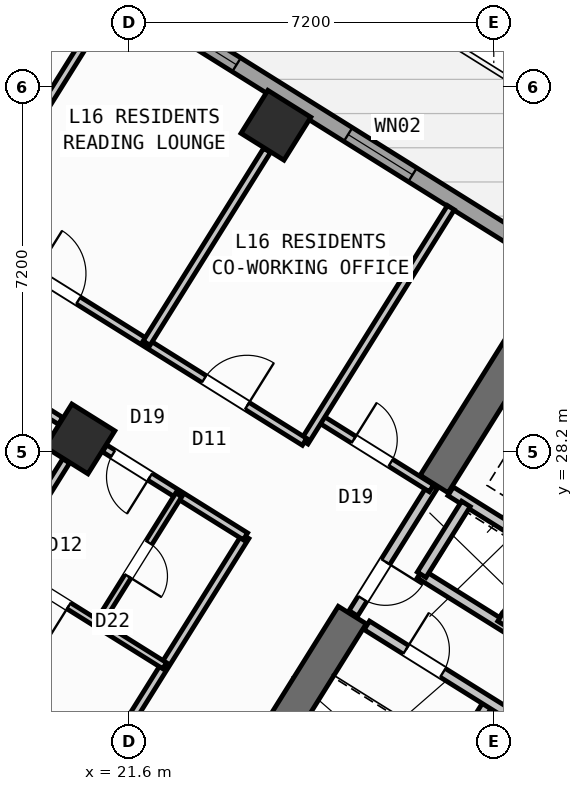
"""IFC4 building model, lengths in metres.
Left out: names, types, materials, properties, quantities, classifications, styles, units other than length and angle.
Written with IfcOpenShell. Run it as: python <this file> out.ifc"""

import sys

from ifc_helpers import new_model, si_unit, direction, frame, frame_2d, origin, origin_2d, place, context, subcontext, project, spatial, rectangle, hollow_rectangle, extrude, source, transform, mapped, element, fill, save


model = new_model("IFC4")
c1 = context("Model", 3, precision=1e-05, world=origin(), true_north=direction((0.0, 1.0)))
c2 = subcontext(c1, "Body", "Model", "MODEL_VIEW")
j1 = project(units=[si_unit("LENGTHUNIT", "METRE"), si_unit("PLANEANGLEUNIT", "RADIAN")], contexts=[c1])
p1 = place(None, origin())
s1 = spatial("IfcSite", under=j1, at=p1, CompositionType="ELEMENT")
p2 = place(p1, origin())
s2 = spatial("IfcBuilding", under=s1, at=p2, CompositionType="ELEMENT")
p3 = place(p2, frame((0.0, 0.0, 63.6)))
s3 = spatial("IfcBuildingStorey", under=s2, at=p3, CompositionType="ELEMENT", Elevation=63.6)
p4 = place(p3, frame((29.491, 30.552, 0.0), z_axis=(0.0, 0.0, 1.0), x_axis=(-0.529893103397, -0.8480644427, 0.0)))
e1 = element("IfcWall", 1, at=p4, inside=s3, PredefinedType="SHEAR", context=c2, shape_type="SweptSolid", body=[
    extrude(rectangle(XDim=3.525, YDim=0.65, at=frame_2d((1.763, 0.0))), origin(), (0.0, 0.0, 1.0), 3.35),
])
p5 = place(p3, frame((26.007, 24.976, 0.0), z_axis=(0.0, 0.0, 1.0), x_axis=(-0.529916319127, -0.848049936456, 0.0)))
e2 = element("IfcWall", 2, at=p5, inside=s3, PredefinedType="SHEAR", context=c2, shape_type="SweptSolid", body=[
    extrude(rectangle(XDim=6.375, YDim=0.65, at=frame_2d((3.188, 0.0))), origin(), (0.0, 0.0, 1.0), 3.35),
])
m1 = source(origin(), c2, "Body", "SweptSolid", [
    extrude(hollow_rectangle(XDim=1.0, YDim=1.0, WallThickness=0.04, at=origin_2d()), origin(), (0.0, 0.0, 1.0), 3.6),
])
for number, where, z_axis, x_axis in (
    (3, (24.5, 34.643, 0.0), (0.0, 0.0, 1.0), (-0.848, 0.53, 0.0)),
    (4, (20.632, 28.452, 0.0), (0.0, 0.0, 1.0), (-0.848, 0.53, 0.0)),
):
    element("IfcColumn", number, at=place(p3, frame(where, z_axis=z_axis, x_axis=x_axis)), inside=s3, PredefinedType="COLUMN", context=c2, shape_type="MappedRepresentation", body=[
        mapped(m1, transform((0.0, 0.0, 0.0), scale=1.0)),
    ])
p6 = place(p3, frame((29.268, 6.429, 0.0), z_axis=(0.0, 0.0, 1.0), x_axis=(-0.848049971435, 0.529916263149, 0.0)))
e5 = element("IfcWall", 5, at=p6, inside=s3, PredefinedType="STANDARD", context=c2, shape_type="SweptSolid", body=[
    extrude(rectangle(XDim=31.588, YDim=0.32, at=frame_2d((15.794, 0.0))), origin(), (0.0, 0.0, 1.0), 3.35),
])
p7 = place(p6, frame((16.362, 0.0, 0.0)))
e6 = element("IfcOpeningElement", 6, at=p7, cuts=e5, PredefinedType="OPENING", context=c2, shape_type="SweptSolid", body=[
    extrude(rectangle(XDim=1.2, YDim=2.15, at=frame_2d((0.6, 1.075))), frame((0.0, 0.17, 0.0), z_axis=(0.0, -1.0, 0.0), x_axis=(1.0, 0.0, 0.0)), (0.0, 0.0, 1.0), 0.34),
])
p8 = place(p6, frame((2.989, 0.0, 0.8)))
e7 = element("IfcOpeningElement", 7, at=p8, cuts=e5, PredefinedType="OPENING", context=c2, shape_type="SweptSolid", body=[
    extrude(rectangle(XDim=2.1, YDim=1.55, at=frame_2d((1.05, 0.775))), frame((0.0, 0.17, 0.0), z_axis=(0.0, -1.0, 0.0), x_axis=(1.0, 0.0, 0.0)), (0.0, 0.0, 1.0), 0.34),
])
p9 = place(p6, frame((8.359, 0.0, 0.8)))
e8 = element("IfcOpeningElement", 8, at=p9, cuts=e5, PredefinedType="OPENING", context=c2, shape_type="SweptSolid", body=[
    extrude(rectangle(XDim=2.1, YDim=1.55, at=frame_2d((1.05, 0.775))), frame((0.0, 0.17, 0.0), z_axis=(0.0, -1.0, 0.0), x_axis=(1.0, 0.0, 0.0)), (0.0, 0.0, 1.0), 0.34),
])
p10 = place(p6, frame((13.284, 0.0, 0.95)))
e9 = element("IfcOpeningElement", 9, at=p10, cuts=e5, PredefinedType="OPENING", context=c2, shape_type="SweptSolid", body=[
    extrude(rectangle(XDim=1.2, YDim=1.4, at=frame_2d((0.6, 0.7))), frame((0.0, 0.17, 0.0), z_axis=(0.0, -1.0, 0.0), x_axis=(1.0, 0.0, 0.0)), (0.0, 0.0, 1.0), 0.34),
])
p11 = place(p6, frame((29.188, 0.0, 0.95)))
e10 = element("IfcOpeningElement", 10, at=p11, cuts=e5, PredefinedType="OPENING", context=c2, shape_type="SweptSolid", body=[
    extrude(rectangle(XDim=1.2, YDim=1.4, at=frame_2d((0.6, 0.7))), frame((0.0, 0.17, 0.0), z_axis=(0.0, -1.0, 0.0), x_axis=(1.0, 0.0, 0.0)), (0.0, 0.0, 1.0), 0.34),
])
p12 = place(p6, frame((19.11, 0.0, 1.0)))
e11 = element("IfcOpeningElement", 11, at=p12, cuts=e5, PredefinedType="OPENING", context=c2, shape_type="SweptSolid", body=[
    extrude(rectangle(XDim=0.9, YDim=1.25, at=frame_2d((0.45, 0.625))), frame((0.0, 0.17, 0.0), z_axis=(0.0, -1.0, 0.0), x_axis=(1.0, 0.0, 0.0)), (0.0, 0.0, 1.0), 0.34),
])
p13 = place(p6, frame((21.226, 0.0, 1.0)))
e12 = element("IfcOpeningElement", 12, at=p13, cuts=e5, PredefinedType="OPENING", context=c2, shape_type="SweptSolid", body=[
    extrude(rectangle(XDim=0.9, YDim=1.25, at=frame_2d((0.45, 0.625))), frame((0.0, 0.17, 0.0), z_axis=(0.0, -1.0, 0.0), x_axis=(1.0, 0.0, 0.0)), (0.0, 0.0, 1.0), 0.34),
])
p14 = place(p6, frame((23.014, 0.0, 1.0)))
e13 = element("IfcOpeningElement", 13, at=p14, cuts=e5, PredefinedType="OPENING", context=c2, shape_type="SweptSolid", body=[
    extrude(rectangle(XDim=0.9, YDim=1.25, at=frame_2d((0.45, 0.625))), frame((0.0, 0.17, 0.0), z_axis=(0.0, -1.0, 0.0), x_axis=(1.0, 0.0, 0.0)), (0.0, 0.0, 1.0), 0.34),
])
p15 = place(p6, frame((24.802, 0.0, 1.0)))
e14 = element("IfcOpeningElement", 14, at=p15, cuts=e5, PredefinedType="OPENING", context=c2, shape_type="SweptSolid", body=[
    extrude(rectangle(XDim=0.9, YDim=1.25, at=frame_2d((0.45, 0.625))), frame((0.0, 0.17, 0.0), z_axis=(0.0, -1.0, 0.0), x_axis=(1.0, 0.0, 0.0)), (0.0, 0.0, 1.0), 0.34),
])
p16 = place(p6, frame((26.59, 0.0, 1.0)))
e15 = element("IfcOpeningElement", 15, at=p16, cuts=e5, PredefinedType="OPENING", context=c2, shape_type="SweptSolid", body=[
    extrude(rectangle(XDim=0.9, YDim=1.25, at=frame_2d((0.45, 0.625))), frame((0.0, 0.17, 0.0), z_axis=(0.0, -1.0, 0.0), x_axis=(1.0, 0.0, 0.0)), (0.0, 0.0, 1.0), 0.34),
])
p17 = place(p3, frame((14.138, 41.825, 0.0), z_axis=(0.0, 0.0, 1.0), x_axis=(0.848046498049, -0.529921821731, 0.0)))
e16 = element("IfcWall", 16, at=p17, inside=s3, PredefinedType="STANDARD", context=c2, shape_type="SweptSolid", body=[
    extrude(rectangle(XDim=31.588, YDim=0.32, at=frame_2d((15.794, 0.0))), origin(), (0.0, 0.0, 1.0), 3.35),
])
p18 = place(p17, frame((2.526, 0.0, 0.0)))
e17 = element("IfcOpeningElement", 17, at=p18, cuts=e16, PredefinedType="OPENING", context=c2, shape_type="SweptSolid", body=[
    extrude(rectangle(XDim=1.05, YDim=2.15, at=frame_2d((0.525, 1.075))), frame((0.0, 0.17, 0.0), z_axis=(0.0, -1.0, 0.0), x_axis=(1.0, 0.0, 0.0)), (0.0, 0.0, 1.0), 0.34),
])
p19 = place(p17, frame((0.825, 0.0, 0.95)))
e18 = element("IfcOpeningElement", 18, at=p19, cuts=e16, PredefinedType="OPENING", context=c2, shape_type="SweptSolid", body=[
    extrude(rectangle(XDim=1.2, YDim=1.4, at=frame_2d((0.6, 0.7))), frame((0.0, 0.17, 0.0), z_axis=(0.0, -1.0, 0.0), x_axis=(1.0, 0.0, 0.0)), (0.0, 0.0, 1.0), 0.34),
])
p20 = place(p17, frame((9.502, 0.0, 0.85)))
e19 = element("IfcOpeningElement", 19, at=p20, cuts=e16, PredefinedType="OPENING", context=c2, shape_type="SweptSolid", body=[
    extrude(rectangle(XDim=1.8, YDim=1.5, at=frame_2d((0.9, 0.75))), frame((0.0, 0.17, 0.0), z_axis=(0.0, -1.0, 0.0), x_axis=(1.0, 0.0, 0.0)), (0.0, 0.0, 1.0), 0.34),
])
p21 = place(p17, frame((13.899, 0.0, 0.85)))
e20 = element("IfcOpeningElement", 20, at=p21, cuts=e16, PredefinedType="OPENING", context=c2, shape_type="SweptSolid", body=[
    extrude(rectangle(XDim=1.5, YDim=1.5, at=frame_2d((0.75, 0.75))), frame((0.0, 0.17, 0.0), z_axis=(0.0, -1.0, 0.0), x_axis=(1.0, 0.0, 0.0)), (0.0, 0.0, 1.0), 0.34),
])
p22 = place(p17, frame((22.019, 0.0, 0.95)))
e21 = element("IfcOpeningElement", 21, at=p22, cuts=e16, PredefinedType="OPENING", context=c2, shape_type="SweptSolid", body=[
    extrude(rectangle(XDim=1.2, YDim=1.4, at=frame_2d((0.6, 0.7))), frame((0.0, 0.17, 0.0), z_axis=(0.0, -1.0, 0.0), x_axis=(1.0, 0.0, 0.0)), (0.0, 0.0, 1.0), 0.34),
])
p23 = place(p17, frame((27.569, 0.0, 0.95)))
e22 = element("IfcOpeningElement", 22, at=p23, cuts=e16, PredefinedType="OPENING", context=c2, shape_type="SweptSolid", body=[
    extrude(rectangle(XDim=1.2, YDim=1.4, at=frame_2d((0.6, 0.7))), frame((0.0, 0.17, 0.0), z_axis=(0.0, -1.0, 0.0), x_axis=(1.0, 0.0, 0.0)), (0.0, 0.0, 1.0), 0.34),
])
p24 = place(p3, frame((31.822, 24.998, 0.0), z_axis=(0.0, 0.0, 1.0), x_axis=(-0.848058348634, 0.529902856485, 0.0)))
e23 = element("IfcWall", 23, at=p24, inside=s3, PredefinedType="STANDARD", context=c2, shape_type="SweptSolid", body=[
    extrude(rectangle(XDim=4.568, YDim=0.2, at=frame_2d((2.284, 0.0))), origin(), (0.0, 0.0, 1.0), 3.34),
])
p25 = place(p3, frame((32.108, 22.814, 0.0), z_axis=(0.0, 0.0, 1.0), x_axis=(-0.848042229521, 0.529928652696, 0.0)))
e24 = element("IfcWall", 24, at=p25, inside=s3, PredefinedType="STANDARD", context=c2, shape_type="SweptSolid", body=[
    extrude(rectangle(XDim=5.62, YDim=0.2, at=frame_2d((2.81, 0.0))), origin(), (0.0, 0.0, 1.0), 3.34),
])
p26 = place(p3, frame((28.25, 27.17, 0.0), z_axis=(0.0, 0.0, 1.0), x_axis=(-0.529905827651, -0.848056492117, 0.0)))
e25 = element("IfcWall", 25, at=p26, inside=s3, PredefinedType="STANDARD", context=c2, shape_type="SweptSolid", body=[
    extrude(rectangle(XDim=1.65, YDim=0.2, at=frame_2d((0.825, 0.0))), origin(), (0.0, 0.0, 1.0), 3.34),
])
p27 = place(p3, frame((29.801, 26.142, 0.0), z_axis=(0.0, 0.0, 1.0), x_axis=(-0.529998940003, -0.847998304005, 0.0)))
e26 = element("IfcWall", 26, at=p27, inside=s3, PredefinedType="STANDARD", context=c2, shape_type="SweptSolid", body=[
    extrude(rectangle(XDim=1.58, YDim=0.2, at=frame_2d((0.79, 0.0))), origin(), (0.0, 0.0, 1.0), 3.34),
])
p28 = place(p3, frame((28.71, 23.263, 0.0), z_axis=(0.0, 0.0, 1.0), x_axis=(-0.529907497854, -0.848055448493, 0.0)))
e27 = element("IfcWall", 27, at=p28, inside=s3, PredefinedType="STANDARD", context=c2, shape_type="SweptSolid", body=[
    extrude(rectangle(XDim=2.88, YDim=0.2, at=frame_2d((1.44, 0.0))), origin(), (0.0, 0.0, 1.0), 3.34),
])
p29 = place(p3, frame((31.525, 21.504, 0.0), z_axis=(0.0, 0.0, 1.0), x_axis=(-0.848044998614, 0.529924221305, 0.0)))
e28 = element("IfcWall", 28, at=p29, inside=s3, PredefinedType="STANDARD", context=c2, shape_type="SweptSolid", body=[
    extrude(rectangle(XDim=6.168, YDim=0.2, at=frame_2d((3.084, 0.0))), origin(), (0.0, 0.0, 1.0), 3.34),
])
p30 = place(p29, frame((4.4, 0.0, 0.0)))
e29 = element("IfcOpeningElement", 29, at=p30, cuts=e28, PredefinedType="OPENING", context=c2, shape_type="SweptSolid", body=[
    extrude(rectangle(XDim=0.86, YDim=2.05, at=frame_2d((0.43, 1.025))), frame((0.0, 0.11, 0.0), z_axis=(0.0, -1.0, 0.0), x_axis=(1.0, 0.0, 0.0)), (0.0, 0.0, 1.0), 0.22),
])
p31 = place(p29, frame((1.45, 0.0, 0.0)))
e30 = element("IfcOpeningElement", 30, at=p31, cuts=e28, PredefinedType="OPENING", context=c2, shape_type="SweptSolid", body=[
    extrude(rectangle(XDim=0.86, YDim=2.05, at=frame_2d((0.43, 1.025))), frame((0.0, 0.11, 0.0), z_axis=(0.0, -1.0, 0.0), x_axis=(1.0, 0.0, 0.0)), (0.0, 0.0, 1.0), 0.22),
])
p32 = place(p3, frame((27.596, 27.52, 0.0), z_axis=(0.0, 0.0, 1.0), x_axis=(-0.529865479138, -0.848081702443, 0.0)))
e31 = element("IfcWall", 31, at=p32, inside=s3, PredefinedType="STANDARD", context=c2, shape_type="SweptSolid", body=[
    extrude(rectangle(XDim=2.96, YDim=0.2, at=frame_2d((1.48, 0.0))), origin(), (0.0, 0.0, 1.0), 3.34),
])
p33 = place(p32, frame((1.76, 0.0, 0.0)))
e32 = element("IfcOpeningElement", 32, at=p33, cuts=e31, PredefinedType="OPENING", context=c2, shape_type="SweptSolid", body=[
    extrude(rectangle(XDim=0.86, YDim=2.05, at=frame_2d((0.43, 1.025))), frame((0.0, 0.11, 0.0), z_axis=(0.0, -1.0, 0.0), x_axis=(1.0, 0.0, 0.0)), (0.0, 0.0, 1.0), 0.22),
])
p34 = place(p3, frame((27.57, 27.478, 0.0), z_axis=(0.0, 0.0, 1.0), x_axis=(-0.848050851465, 0.529914854792, 0.0)))
e33 = element("IfcWall", 33, at=p34, inside=s3, PredefinedType="PARTITIONING", context=c2, shape_type="SweptSolid", body=[
    extrude(rectangle(XDim=2.61, YDim=0.16, at=frame_2d((1.305, 0.0))), origin(), (0.0, 0.0, 1.0), 3.34),
])
p35 = place(p34, frame((0.95, 0.0, 0.0)))
e34 = element("IfcOpeningElement", 34, at=p35, cuts=e33, PredefinedType="OPENING", context=c2, shape_type="SweptSolid", body=[
    extrude(rectangle(XDim=0.86, YDim=2.05, at=frame_2d((0.43, 1.025))), frame((0.0, 0.09, 0.0), z_axis=(0.0, -1.0, 0.0), x_axis=(1.0, 0.0, 0.0)), (0.0, 0.0, 1.0), 0.18),
])
p36 = place(p3, frame((27.953, 33.016, 0.0), z_axis=(0.0, 0.0, 1.0), x_axis=(-0.529906322364, -0.848056182997, 0.0)))
e35 = element("IfcWall", 35, at=p36, inside=s3, PredefinedType="PARTITIONING", context=c2, shape_type="SweptSolid", body=[
    extrude(rectangle(XDim=5.45, YDim=0.16, at=frame_2d((2.725, 0.0))), origin(), (0.0, 0.0, 1.0), 3.34),
])
p37 = place(p3, frame((23.899, 26.529, 0.0), z_axis=(0.0, 0.0, 1.0), x_axis=(-0.529917716469, -0.848049063305, 0.0)))
e36 = element("IfcWall", 36, at=p37, inside=s3, PredefinedType="PARTITIONING", context=c2, shape_type="SweptSolid", body=[
    extrude(rectangle(XDim=14.05, YDim=0.16, at=frame_2d((7.025, 0.0))), origin(), (0.0, 0.0, 1.0), 3.34),
])
p38 = place(p3, frame((25.065, 28.394, 0.0), z_axis=(0.0, 0.0, 1.0), x_axis=(-0.848048310262, 0.529918921593, 0.0)))
e37 = element("IfcWall", 37, at=p38, inside=s3, PredefinedType="PARTITIONING", context=c2, shape_type="SweptSolid", body=[
    extrude(rectangle(XDim=16.73, YDim=0.16, at=frame_2d((8.365, 0.0))), origin(), (0.0, 0.0, 1.0), 3.34),
])
p39 = place(p38, frame((1.338, 0.0, 0.0)))
e38 = element("IfcOpeningElement", 38, at=p39, cuts=e37, PredefinedType="OPENING", context=c2, shape_type="SweptSolid", body=[
    extrude(rectangle(XDim=1.0, YDim=2.1, at=frame_2d((0.5, 1.05))), frame((0.0, 0.09, 0.0), z_axis=(0.0, -1.0, 0.0), x_axis=(1.0, 0.0, 0.0)), (0.0, 0.0, 1.0), 0.18),
])
p40 = place(p38, frame((5.265, 0.0, 0.0)))
e39 = element("IfcOpeningElement", 39, at=p40, cuts=e37, PredefinedType="OPENING", context=c2, shape_type="SweptSolid", body=[
    extrude(rectangle(XDim=1.0, YDim=2.1, at=frame_2d((0.5, 1.05))), frame((0.0, 0.09, 0.0), z_axis=(0.0, -1.0, 0.0), x_axis=(1.0, 0.0, 0.0)), (0.0, 0.0, 1.0), 0.18),
])
p41 = place(p38, frame((9.526, 0.0, 0.0)))
e40 = element("IfcOpeningElement", 40, at=p41, cuts=e37, PredefinedType="OPENING", context=c2, shape_type="SweptSolid", body=[
    extrude(rectangle(XDim=1.0, YDim=2.1, at=frame_2d((0.5, 1.05))), frame((0.0, 0.09, 0.0), z_axis=(0.0, -1.0, 0.0), x_axis=(1.0, 0.0, 0.0)), (0.0, 0.0, 1.0), 0.18),
])
p42 = place(p38, frame((13.954, 0.0, 0.0)))
e41 = element("IfcOpeningElement", 41, at=p42, cuts=e37, PredefinedType="OPENING", context=c2, shape_type="SweptSolid", body=[
    extrude(rectangle(XDim=1.0, YDim=2.1, at=frame_2d((0.5, 1.05))), frame((0.0, 0.09, 0.0), z_axis=(0.0, -1.0, 0.0), x_axis=(1.0, 0.0, 0.0)), (0.0, 0.0, 1.0), 0.18),
])
p43 = place(p3, frame((23.899, 26.529, 0.0), z_axis=(0.0, 0.0, 1.0), x_axis=(-0.848061058944, 0.529898518871, 0.0)))
e42 = element("IfcWall", 42, at=p43, inside=s3, PredefinedType="PARTITIONING", context=c2, shape_type="SweptSolid", body=[
    extrude(rectangle(XDim=3.278, YDim=0.16, at=frame_2d((1.639, 0.0))), origin(), (0.0, 0.0, 1.0), 2.725),
])
p44 = place(p43, frame((2.22, 0.0, 0.0)))
e43 = element("IfcOpeningElement", 43, at=p44, cuts=e42, PredefinedType="OPENING", context=c2, shape_type="SweptSolid", body=[
    extrude(rectangle(XDim=0.86, YDim=2.05, at=frame_2d((0.43, 1.025))), frame((0.0, 0.09, 0.0), z_axis=(0.0, -1.0, 0.0), x_axis=(1.0, 0.0, 0.0)), (0.0, 0.0, 1.0), 0.18),
])
p45 = place(p3, frame((20.251, 28.808, 0.0), z_axis=(0.0, 0.0, 1.0), x_axis=(-0.848044224181, 0.529925460639, 0.0)))
e44 = element("IfcWall", 44, at=p45, inside=s3, PredefinedType="PARTITIONING", context=c2, shape_type="SweptSolid", body=[
    extrude(rectangle(XDim=5.376, YDim=0.16, at=frame_2d((2.688, 0.0))), origin(), (0.0, 0.0, 1.0), 2.725),
])
p46 = place(p3, frame((20.361, 28.018, 0.0), z_axis=(0.0, 0.0, 1.0), x_axis=(-0.529915015264, -0.848050751193, 0.0)))
e45 = element("IfcWall", 45, at=p46, inside=s3, PredefinedType="PARTITIONING", context=c2, shape_type="SweptSolid", body=[
    extrude(rectangle(XDim=6.276, YDim=0.16, at=frame_2d((3.138, 0.0))), origin(), (0.0, 0.0, 1.0), 2.725),
])
p47 = place(p3, frame((22.304, 23.976, 0.0), z_axis=(0.0, 0.0, 1.0), x_axis=(-0.84803087207, 0.529946827537, 0.0)))
e46 = element("IfcWall", 46, at=p47, inside=s3, PredefinedType="PLUMBINGWALL", context=c2, shape_type="SweptSolid", body=[
    extrude(rectangle(XDim=3.79, YDim=0.14, at=frame_2d((1.895, 0.0))), origin(), (0.0, 0.0, 1.0), 3.34),
])
p48 = place(p47, frame((2.23, 0.0, 0.0)))
e47 = element("IfcOpeningElement", 47, at=p48, cuts=e46, PredefinedType="OPENING", context=c2, shape_type="SweptSolid", body=[
    extrude(rectangle(XDim=0.92, YDim=2.08, at=frame_2d((0.46, 1.04))), frame((0.0, 0.08, 0.0), z_axis=(0.0, -1.0, 0.0), x_axis=(1.0, 0.0, 0.0)), (0.0, 0.0, 1.0), 0.16),
])
p49 = place(p3, frame((22.585, 27.35, 0.0), z_axis=(0.0, 0.0, 1.0), x_axis=(-0.529977067289, -0.848011974059, 0.0)))
e48 = element("IfcWall", 48, at=p49, inside=s3, PredefinedType="PLUMBINGWALL", context=c2, shape_type="SweptSolid", body=[
    extrude(rectangle(XDim=3.01, YDim=0.14, at=frame_2d((1.505, 0.0))), origin(), (0.0, 0.0, 1.0), 2.995),
])
p50 = place(p49, frame((1.115, 0.0, 0.0)))
e49 = element("IfcOpeningElement", 49, at=p50, cuts=e48, PredefinedType="OPENING", context=c2, shape_type="SweptSolid", body=[
    extrude(rectangle(XDim=0.78, YDim=2.05, at=frame_2d((0.39, 1.025))), frame((0.0, 0.08, 0.0), z_axis=(0.0, -1.0, 0.0), x_axis=(1.0, 0.0, 0.0)), (0.0, 0.0, 1.0), 0.16),
])
p51 = place(p3, frame((24.326, 34.148, 0.0), z_axis=(0.0, 0.0, 1.0), x_axis=(-0.529915808518, -0.848050255517, 0.0)))
e50 = element("IfcWall", 50, at=p51, inside=s3, PredefinedType="PARTITIONING", context=c2, shape_type="SweptSolid", body=[
    extrude(rectangle(XDim=4.488, YDim=0.16, at=frame_2d((2.244, 0.0))), origin(), (0.0, 0.0, 1.0), 2.725),
])
p52 = place(p3, frame((21.292, 37.178, 0.0), z_axis=(0.0, 0.0, 1.0), x_axis=(-0.529938539346, -0.848036051425, 0.0)))
e51 = element("IfcWall", 51, at=p52, inside=s3, PredefinedType="PARTITIONING", context=c2, shape_type="SweptSolid", body=[
    extrude(rectangle(XDim=5.45, YDim=0.16, at=frame_2d((2.725, 0.0))), origin(), (0.0, 0.0, 1.0), 2.995),
])
m2 = source(origin(), c2, "Body", "SweptSolid", [
    extrude(rectangle(XDim=1.8, YDim=1.5, at=frame_2d((0.9, 0.75))), frame((0.0, 0.03, 0.0), z_axis=(0.0, -1.0, 0.0), x_axis=(1.0, 0.0, 0.0)), (0.0, 0.0, 1.0), 0.06),
])
p53 = place(p20, origin())
e52 = element("IfcWindow", 52, at=p53, inside=s3, PartitioningType="SINGLE_PANEL", PredefinedType="WINDOW", context=c2, shape_type="MappedRepresentation", body=[
    mapped(m2, transform((0.0, 0.0, 0.0), scale=1.0)),
])
fill(e19, e52)
m3 = source(origin(), c2, "Body", "SweptSolid", [
    extrude(rectangle(XDim=1.5, YDim=1.5, at=frame_2d((0.75, 0.75))), frame((0.0, 0.03, 0.0), z_axis=(0.0, -1.0, 0.0), x_axis=(1.0, 0.0, 0.0)), (0.0, 0.0, 1.0), 0.06),
])
p54 = place(p21, origin())
e53 = element("IfcWindow", 53, at=p54, inside=s3, PartitioningType="SINGLE_PANEL", PredefinedType="WINDOW", context=c2, shape_type="MappedRepresentation", body=[
    mapped(m3, transform((0.0, 0.0, 0.0), scale=1.0)),
])
fill(e20, e53)
m4 = source(origin(), c2, "Body", "SweptSolid", [
    extrude(rectangle(XDim=0.86, YDim=2.05, at=frame_2d((0.43, 1.025))), frame((0.0, 0.025, 0.0), z_axis=(0.0, -1.0, 0.0), x_axis=(1.0, 0.0, 0.0)), (0.0, 0.0, 1.0), 0.05),
])
p55 = place(p30, frame((0.86, 0.0, 0.0), z_axis=(0.0, 0.0, 1.0), x_axis=(-1.0, 0.0, 0.0)))
e54 = element("IfcDoor", 54, at=p55, inside=s3, OperationType="SINGLE_SWING_LEFT", PredefinedType="DOOR", context=c2, shape_type="MappedRepresentation", body=[
    mapped(m4, transform((0.0, 0.0, 0.0), scale=1.0)),
])
fill(e29, e54)
p56 = place(p35, frame((0.86, 0.0, 0.0), z_axis=(0.0, 0.0, 1.0), x_axis=(-1.0, 0.0, 0.0)))
e55 = element("IfcDoor", 55, at=p56, inside=s3, OperationType="SINGLE_SWING_LEFT", PredefinedType="DOOR", context=c2, shape_type="MappedRepresentation", body=[
    mapped(m4, transform((0.0, 0.0, 0.0), scale=1.0)),
])
fill(e34, e55)
p57 = place(p33, origin())
e56 = element("IfcDoor", 56, at=p57, inside=s3, OperationType="SINGLE_SWING_LEFT", PredefinedType="DOOR", context=c2, shape_type="MappedRepresentation", body=[
    mapped(m4, transform((0.0, 0.0, 0.0), scale=1.0)),
])
fill(e32, e56)
p58 = place(p44, origin())
e57 = element("IfcDoor", 57, at=p58, inside=s3, OperationType="SINGLE_SWING_LEFT", PredefinedType="DOOR", context=c2, shape_type="MappedRepresentation", body=[
    mapped(m4, transform((0.0, 0.0, 0.0), scale=1.0)),
])
fill(e43, e57)
m5 = source(origin(), c2, "Body", "SweptSolid", [
    extrude(rectangle(XDim=0.92, YDim=2.08, at=frame_2d((0.46, 1.04))), frame((0.0, 0.025, 0.0), z_axis=(0.0, -1.0, 0.0), x_axis=(1.0, 0.0, 0.0)), (0.0, 0.0, 1.0), 0.05),
])
p59 = place(p48, origin())
e58 = element("IfcDoor", 58, at=p59, inside=s3, OperationType="SINGLE_SWING_LEFT", PredefinedType="DOOR", context=c2, shape_type="MappedRepresentation", body=[
    mapped(m5, transform((0.0, 0.0, 0.0), scale=1.0)),
])
fill(e47, e58)
m6 = source(origin(), c2, "Body", "SweptSolid", [
    extrude(rectangle(XDim=0.78, YDim=2.05, at=frame_2d((0.39, 1.025))), frame((0.0, 0.025, 0.0), z_axis=(0.0, -1.0, 0.0), x_axis=(1.0, 0.0, 0.0)), (0.0, 0.0, 1.0), 0.05),
])
p60 = place(p50, origin())
e59 = element("IfcDoor", 59, at=p60, inside=s3, OperationType="SINGLE_SWING_RIGHT", PredefinedType="DOOR", context=c2, shape_type="MappedRepresentation", body=[
    mapped(m6, transform((0.0, 0.0, 0.0), scale=1.0)),
])
fill(e49, e59)
m7 = source(origin(), c2, "Body", "SweptSolid", [
    extrude(rectangle(XDim=1.0, YDim=2.1, at=frame_2d((0.5, 1.05))), frame((0.0, 0.025, 0.0), z_axis=(0.0, -1.0, 0.0), x_axis=(1.0, 0.0, 0.0)), (0.0, 0.0, 1.0), 0.05),
])
p61 = place(p39, frame((1.0, 0.0, 0.0), z_axis=(0.0, 0.0, 1.0), x_axis=(-1.0, 0.0, 0.0)))
e60 = element("IfcDoor", 60, at=p61, inside=s3, OperationType="SINGLE_SWING_RIGHT", PredefinedType="DOOR", context=c2, shape_type="MappedRepresentation", body=[
    mapped(m7, transform((0.0, 0.0, 0.0), scale=1.0)),
])
fill(e38, e60)
p62 = place(p40, frame((1.0, 0.0, 0.0), z_axis=(0.0, 0.0, 1.0), x_axis=(-1.0, 0.0, 0.0)))
e61 = element("IfcDoor", 61, at=p62, inside=s3, OperationType="SINGLE_SWING_LEFT", PredefinedType="DOOR", context=c2, shape_type="MappedRepresentation", body=[
    mapped(m7, transform((0.0, 0.0, 0.0), scale=1.0)),
])
fill(e39, e61)
save(model, sys.argv[1])
